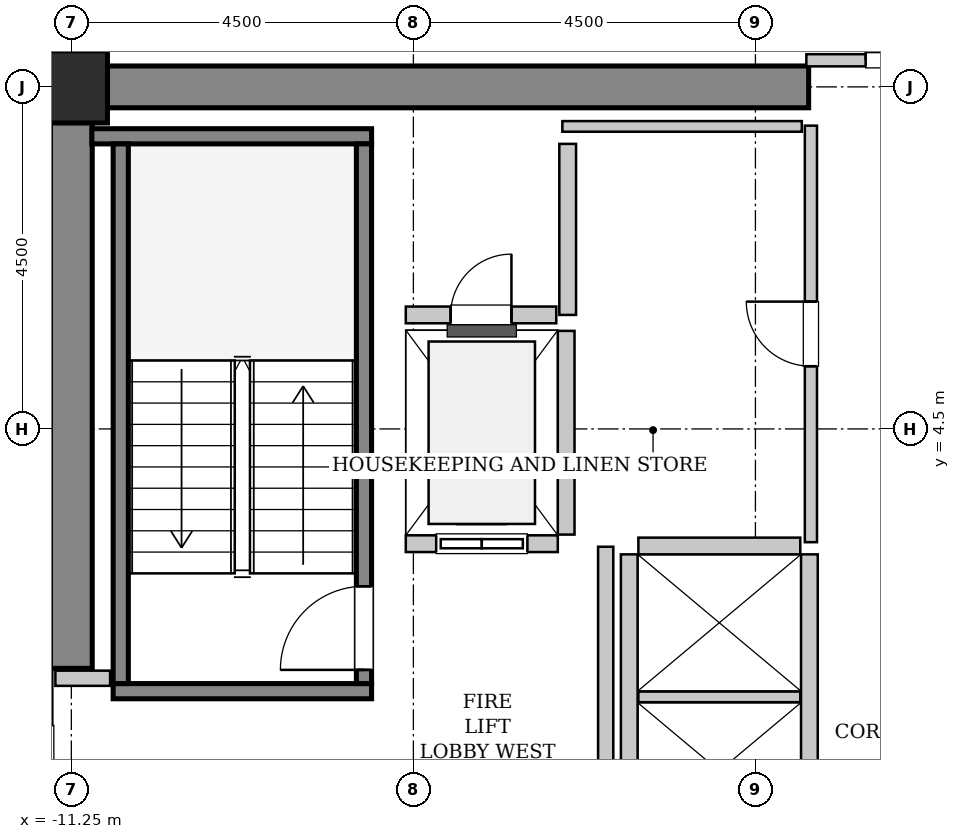
"""IFC4 building model, lengths in metres.
Left out: names, types, materials, properties, quantities, classifications, styles, units other than length and angle.
Written with IfcOpenShell. Run it as: python <this file> out.ifc"""

import sys

from ifc_helpers import new_model, si_unit, direction, frame, frame_2d, origin, origin_2d, place, context, subcontext, project, spatial, rectangle, hollow_rectangle, extrude, source, transform, mapped, element, fill, save


model = new_model("IFC4")
c1 = context("Model", 3, precision=1e-05, world=origin(), true_north=direction((0.0, 1.0)))
c2 = subcontext(c1, "Body", "Model", "MODEL_VIEW")
j1 = project(units=[si_unit("LENGTHUNIT", "METRE"), si_unit("PLANEANGLEUNIT", "RADIAN")], contexts=[c1])
p1 = place(None, origin())
s1 = spatial("IfcSite", under=j1, at=p1, CompositionType="ELEMENT")
p2 = place(p1, origin())
s2 = spatial("IfcBuilding", under=s1, at=p2, CompositionType="ELEMENT")
p3 = place(p2, frame((0.0, 0.0, 175.4)))
s3 = spatial("IfcBuildingStorey", under=s2, at=p3, CompositionType="ELEMENT", Elevation=175.4)
m1 = source(origin(), c2, "Body", "SweptSolid", [
    extrude(rectangle(XDim=9.975, YDim=0.55, at=frame_2d((4.987, 0.0))), origin(), (0.0, 0.0, 1.0), 3.8),
])
p4 = place(p3, frame((-11.525, 9.0, 0.0), z_axis=(0.0, 0.0, 1.0), x_axis=(1.0, 0.0, 0.0)))
e1 = element("IfcWall", 1, at=p4, inside=s3, PredefinedType="SHEAR", context=c2, shape_type="MappedRepresentation", body=[
    mapped(m1, transform((0.0, 0.0, 0.0), x_axis=(1.0, 0.0, 0.0), y_axis=(0.0, 1.0, 0.0), z_axis=(0.0, 0.0, 1.0), scale=1.0)),
])
m2 = source(origin(), c2, "Body", "SweptSolid", [
    extrude(rectangle(XDim=7.375, YDim=0.55, at=frame_2d((3.688, 0.0))), origin(), (0.0, 0.0, 1.0), 3.8),
])
p5 = place(p3, frame((-11.25, 1.35, 0.0), z_axis=(0.0, 0.0, 1.0), x_axis=(0.0, 1.0, 0.0)))
e2 = element("IfcWall", 2, at=p5, inside=s3, PredefinedType="SHEAR", context=c2, shape_type="MappedRepresentation", body=[
    mapped(m2, transform((0.0, 0.0, 0.0), x_axis=(1.0, 0.0, 0.0), y_axis=(0.0, 1.0, 0.0), z_axis=(0.0, 0.0, 1.0), scale=1.0)),
])
m3 = source(origin(), c2, "Body", "SweptSolid", [
    extrude(hollow_rectangle(XDim=0.95, YDim=0.95, WallThickness=0.045, InnerFilletRadius=0.045, OuterFilletRadius=0.09, at=origin_2d()), origin(), (0.0, 0.0, 1.0), 3.8),
])
p6 = place(p3, frame((-11.25, 9.0, 0.0), z_axis=(0.0, 0.0, 1.0), x_axis=(1.0, 0.0, 0.0)))
e3 = element("IfcColumn", 3, at=p6, inside=s3, PredefinedType="COLUMN", context=c2, shape_type="MappedRepresentation", body=[
    mapped(m3, transform((0.0, 0.0, 0.0), x_axis=(1.0, 0.0, 0.0), y_axis=(0.0, 1.0, 0.0), z_axis=(0.0, 0.0, 1.0), scale=1.0)),
])
m4 = source(origin(), c2, "Body", "SweptSolid", [
    extrude(rectangle(XDim=3.4, YDim=0.2, at=frame_2d((1.7, 0.0))), origin(), (0.0, 0.0, 1.0), 3.8),
])
p7 = place(p3, frame((-7.3, 1.05, 0.0), z_axis=(0.0, 0.0, 1.0), x_axis=(-1.0, 0.0, 0.0)))
e4 = element("IfcWall", 4, at=p7, inside=s3, PredefinedType="SOLIDWALL", context=c2, shape_type="MappedRepresentation", body=[
    mapped(m4, transform((0.0, 0.0, 0.0), x_axis=(1.0, 0.0, 0.0), y_axis=(0.0, 1.0, 0.0), z_axis=(0.0, 0.0, 1.0), scale=1.0)),
])
m5 = source(origin(), c2, "Body", "SweptSolid", [
    extrude(rectangle(XDim=3.68, YDim=0.2, at=frame_2d((1.84, 0.0))), origin(), (0.0, 0.0, 1.0), 3.8),
])
p8 = place(p3, frame((-7.3, 8.35, 0.0), z_axis=(0.0, 0.0, 1.0), x_axis=(-1.0, 0.0, 0.0)))
e5 = element("IfcWall", 5, at=p8, inside=s3, PredefinedType="SOLIDWALL", context=c2, shape_type="MappedRepresentation", body=[
    mapped(m5, transform((0.0, 0.0, 0.0), x_axis=(1.0, 0.0, 0.0), y_axis=(0.0, 1.0, 0.0), z_axis=(0.0, 0.0, 1.0), scale=1.0)),
])
m6 = source(origin(), c2, "Body", "SweptSolid", [
    extrude(rectangle(XDim=7.1, YDim=0.2, at=frame_2d((3.55, 0.0))), origin(), (0.0, 0.0, 1.0), 3.8),
])
p9 = place(p3, frame((-7.4, 1.15, 0.0), z_axis=(0.0, 0.0, 1.0), x_axis=(0.0, 1.0, 0.0)))
e6 = element("IfcWall", 6, at=p9, inside=s3, PredefinedType="SOLIDWALL", context=c2, shape_type="MappedRepresentation", body=[
    mapped(m6, transform((0.0, 0.0, 0.0), x_axis=(1.0, 0.0, 0.0), y_axis=(0.0, 1.0, 0.0), z_axis=(0.0, 0.0, 1.0), scale=1.0)),
])
p10 = place(p9, frame((0.18, 0.0, 0.0)))
e7 = element("IfcOpeningElement", 7, at=p10, cuts=e6, PredefinedType="OPENING", context=c2, shape_type="SweptSolid", body=[
    extrude(rectangle(XDim=1.1, YDim=2.15, at=frame_2d((0.55, 1.075))), frame((0.0, 0.11, 0.0), z_axis=(0.0, -1.0, 0.0), x_axis=(1.0, 0.0, 0.0)), (0.0, 0.0, 1.0), 0.22),
])
p11 = place(p3, frame((-10.6, 1.15, 0.0), z_axis=(0.0, 0.0, 1.0), x_axis=(0.0, 1.0, 0.0)))
e8 = element("IfcWall", 8, at=p11, inside=s3, PredefinedType="SOLIDWALL", context=c2, shape_type="MappedRepresentation", body=[
    mapped(m6, transform((0.0, 0.0, 0.0), x_axis=(1.0, 0.0, 0.0), y_axis=(0.0, 1.0, 0.0), z_axis=(0.0, 0.0, 1.0), scale=1.0)),
])
m7 = source(origin(), c2, "Body", "SweptSolid", [
    extrude(rectangle(XDim=2.0, YDim=0.22, at=frame_2d((1.0, 0.0))), origin(), (0.0, 0.0, 1.0), 3.535),
])
p12 = place(p3, frame((-6.85, 2.99, 0.0), z_axis=(0.0, 0.0, 1.0), x_axis=(1.0, 0.0, 0.0)))
e9 = element("IfcWall", 9, at=p12, inside=s3, PredefinedType="SOLIDWALL", context=c2, shape_type="MappedRepresentation", body=[
    mapped(m7, transform((0.0, 0.0, 0.0), x_axis=(1.0, 0.0, 0.0), y_axis=(0.0, 1.0, 0.0), z_axis=(0.0, 0.0, 1.0), scale=1.0)),
])
p13 = place(p12, frame((0.4, 0.0, 0.0)))
e10 = element("IfcOpeningElement", 10, at=p13, cuts=e9, PredefinedType="OPENING", context=c2, shape_type="SweptSolid", body=[
    extrude(rectangle(XDim=1.2, YDim=2.2, at=frame_2d((0.6, 1.1))), frame((0.0, 0.12, 0.0), z_axis=(0.0, -1.0, 0.0), x_axis=(1.0, 0.0, 0.0)), (0.0, 0.0, 1.0), 0.24),
])
m8 = source(origin(), c2, "Body", "SweptSolid", [
    extrude(rectangle(XDim=2.68, YDim=0.22, at=frame_2d((1.34, 0.0))), origin(), (0.0, 0.0, 1.0), 3.535),
])
p14 = place(p3, frame((-4.74, 3.11, 0.0), z_axis=(0.0, 0.0, 1.0), x_axis=(0.0, 1.0, 0.0)))
e11 = element("IfcWall", 11, at=p14, inside=s3, PredefinedType="SOLIDWALL", context=c2, shape_type="MappedRepresentation", body=[
    mapped(m8, transform((0.0, 0.0, 0.0), x_axis=(1.0, 0.0, 0.0), y_axis=(0.0, 1.0, 0.0), z_axis=(0.0, 0.0, 1.0), scale=1.0)),
])
m9 = source(origin(), c2, "Body", "SweptSolid", [
    extrude(rectangle(XDim=5.7, YDim=0.22, at=frame_2d((2.85, 0.0))), origin(), (0.0, 0.0, 1.0), 3.535),
])
for number, where, z_axis, x_axis in (
    (12, (-1.54, -2.85, 0.0), (0.0, 0.0, 1.0), (0.0, 1.0, 0.0)),
    (13, (-3.91, 2.85, 0.0), (0.0, 0.0, 1.0), (0.0, -1.0, 0.0)),
):
    element("IfcWall", number, at=place(p3, frame(where, z_axis=z_axis, x_axis=x_axis)), inside=s3, PredefinedType="SOLIDWALL", context=c2, shape_type="MappedRepresentation", body=[
        mapped(m9, transform((0.0, 0.0, 0.0), x_axis=(1.0, 0.0, 0.0), y_axis=(0.0, 1.0, 0.0), z_axis=(0.0, 0.0, 1.0), scale=1.0)),
    ])
m10 = source(origin(), c2, "Body", "SweptSolid", [
    extrude(rectangle(XDim=2.13, YDim=0.14, at=frame_2d((1.065, 0.0))), origin(), (0.0, 0.0, 1.0), 3.535),
])
p15 = place(p3, frame((-3.79, 0.975, 0.0), z_axis=(0.0, 0.0, 1.0), x_axis=(1.0, 0.0, 0.0)))
e14 = element("IfcWall", 14, at=p15, inside=s3, PredefinedType="PARTITIONING", context=c2, shape_type="MappedRepresentation", body=[
    mapped(m10, transform((0.0, 0.0, 0.0), x_axis=(1.0, 0.0, 0.0), y_axis=(0.0, 1.0, 0.0), z_axis=(0.0, 0.0, 1.0), scale=1.0)),
])
m11 = source(origin(), c2, "Body", "SweptSolid", [
    extrude(rectangle(XDim=2.13, YDim=0.22, at=frame_2d((1.065, 0.0))), origin(), (0.0, 0.0, 1.0), 3.535),
])
p16 = place(p3, frame((-1.66, 2.96, 0.0), z_axis=(0.0, 0.0, 1.0), x_axis=(-1.0, 0.0, 0.0)))
e15 = element("IfcWall", 15, at=p16, inside=s3, PredefinedType="SOLIDWALL", context=c2, shape_type="MappedRepresentation", body=[
    mapped(m11, transform((0.0, 0.0, 0.0), x_axis=(1.0, 0.0, 0.0), y_axis=(0.0, 1.0, 0.0), z_axis=(0.0, 0.0, 1.0), scale=1.0)),
])
m12 = source(origin(), c2, "Body", "SweptSolid", [
    extrude(rectangle(XDim=2.25, YDim=0.22, at=frame_2d((1.125, 0.0))), origin(), (0.0, 0.0, 1.0), 3.535),
])
p17 = place(p3, frame((-4.72, 6.0, 0.0), z_axis=(0.0, 0.0, 1.0), x_axis=(0.0, 1.0, 0.0)))
e16 = element("IfcWall", 16, at=p17, inside=s3, PredefinedType="SOLIDWALL", context=c2, shape_type="MappedRepresentation", body=[
    mapped(m12, transform((0.0, 0.0, 0.0), x_axis=(1.0, 0.0, 0.0), y_axis=(0.0, 1.0, 0.0), z_axis=(0.0, 0.0, 1.0), scale=1.0)),
])
m13 = source(origin(), c2, "Body", "SweptSolid", [
    extrude(rectangle(XDim=1.98, YDim=0.22, at=frame_2d((0.99, 0.0))), origin(), (0.0, 0.0, 1.0), 3.535),
])
p18 = place(p3, frame((-6.85, 6.0, 0.0), z_axis=(0.0, 0.0, 1.0), x_axis=(1.0, 0.0, 0.0)))
e17 = element("IfcWall", 17, at=p18, inside=s3, PredefinedType="SOLIDWALL", context=c2, shape_type="MappedRepresentation", body=[
    mapped(m13, transform((0.0, 0.0, 0.0), x_axis=(1.0, 0.0, 0.0), y_axis=(0.0, 1.0, 0.0), z_axis=(0.0, 0.0, 1.0), scale=1.0)),
])
p19 = place(p18, frame((0.59, 0.0, 0.0)))
e18 = element("IfcOpeningElement", 18, at=p19, cuts=e17, PredefinedType="OPENING", context=c2, shape_type="SweptSolid", body=[
    extrude(rectangle(XDim=0.8, YDim=2.0, at=frame_2d((0.4, 1.0))), frame((0.0, 0.12, 0.0), z_axis=(0.0, -1.0, 0.0), x_axis=(1.0, 0.0, 0.0)), (0.0, 0.0, 1.0), 0.24),
])
m14 = source(origin(), c2, "Body", "SweptSolid", [
    extrude(rectangle(XDim=5.9, YDim=0.2, at=frame_2d((2.95, 0.0))), origin(), (0.0, 0.0, 1.0), 3.535),
])
p20 = place(p3, frame((-4.22, -2.95, 0.0), z_axis=(0.0, 0.0, 1.0), x_axis=(0.0, 1.0, 0.0)))
e19 = element("IfcWall", 19, at=p20, inside=s3, PredefinedType="PARTITIONING", context=c2, shape_type="MappedRepresentation", body=[
    mapped(m14, transform((0.0, 0.0, 0.0), x_axis=(1.0, 0.0, 0.0), y_axis=(0.0, 1.0, 0.0), z_axis=(0.0, 0.0, 1.0), scale=1.0)),
])
m15 = source(origin(), c2, "Body", "SweptSolid", [
    extrude(rectangle(XDim=0.72, YDim=0.2, at=frame_2d((0.36, 0.0))), origin(), (0.0, 0.0, 1.0), 3.535),
])
p21 = place(p3, frame((-11.46, 1.22, 0.0), z_axis=(0.0, 0.0, 1.0), x_axis=(1.0, 0.0, 0.0)))
e20 = element("IfcWall", 20, at=p21, inside=s3, PredefinedType="PARTITIONING", context=c2, shape_type="MappedRepresentation", body=[
    mapped(m15, transform((0.0, 0.0, 0.0), x_axis=(1.0, 0.0, 0.0), y_axis=(0.0, 1.0, 0.0), z_axis=(0.0, 0.0, 1.0), scale=1.0)),
])
m16 = source(origin(), c2, "Body", "SweptSolid", [
    extrude(rectangle(XDim=3.16, YDim=0.16, at=frame_2d((1.58, 0.0))), origin(), (0.0, 0.0, 1.0), 2.425),
])
p22 = place(p3, frame((-1.58, 9.35, 0.0), z_axis=(0.0, 0.0, 1.0), x_axis=(1.0, 0.0, 0.0)))
e21 = element("IfcWall", 21, at=p22, inside=s3, PredefinedType="PARTITIONING", context=c2, shape_type="MappedRepresentation", body=[
    mapped(m16, transform((0.0, 0.0, 0.0), x_axis=(1.0, 0.0, 0.0), y_axis=(0.0, 1.0, 0.0), z_axis=(0.0, 0.0, 1.0), scale=1.0)),
])
p23 = place(p22, frame((0.78, 0.0, 0.0)))
e22 = element("IfcOpeningElement", 22, at=p23, cuts=e21, PredefinedType="OPENING", context=c2, shape_type="SweptSolid", body=[
    extrude(rectangle(XDim=1.6, YDim=2.3, at=frame_2d((0.8, 1.15))), frame((0.0, 0.09, 0.0), z_axis=(0.0, -1.0, 0.0), x_axis=(1.0, 0.0, 0.0)), (0.0, 0.0, 1.0), 0.18),
])
m17 = source(origin(), c2, "Body", "SweptSolid", [
    extrude(rectangle(XDim=5.48, YDim=0.16, at=frame_2d((2.74, 0.0))), origin(), (0.0, 0.0, 1.0), 3.535),
])
p24 = place(p3, frame((-1.52, 3.01, 0.0), z_axis=(0.0, 0.0, 1.0), x_axis=(0.0, 1.0, 0.0)))
e23 = element("IfcWall", 23, at=p24, inside=s3, PredefinedType="PARTITIONING", context=c2, shape_type="MappedRepresentation", body=[
    mapped(m17, transform((0.0, 0.0, 0.0), x_axis=(1.0, 0.0, 0.0), y_axis=(0.0, 1.0, 0.0), z_axis=(0.0, 0.0, 1.0), scale=1.0)),
])
p25 = place(p24, frame((2.315, 0.0, 0.0)))
e24 = element("IfcOpeningElement", 24, at=p25, cuts=e23, PredefinedType="OPENING", context=c2, shape_type="SweptSolid", body=[
    extrude(rectangle(XDim=0.85, YDim=2.1, at=frame_2d((0.425, 1.05))), frame((0.0, 0.09, 0.0), z_axis=(0.0, -1.0, 0.0), x_axis=(1.0, 0.0, 0.0)), (0.0, 0.0, 1.0), 0.18),
])
m18 = source(origin(), c2, "Body", "SweptSolid", [
    extrude(rectangle(XDim=3.15, YDim=0.14, at=frame_2d((1.575, 0.0))), origin(), (0.0, 0.0, 1.0), 3.535),
])
p26 = place(p3, frame((-4.79, 8.48, 0.0), z_axis=(0.0, 0.0, 1.0), x_axis=(1.0, 0.0, 0.0)))
e25 = element("IfcWall", 25, at=p26, inside=s3, PredefinedType="PARTITIONING", context=c2, shape_type="MappedRepresentation", body=[
    mapped(m18, transform((0.0, 0.0, 0.0), x_axis=(1.0, 0.0, 0.0), y_axis=(0.0, 1.0, 0.0), z_axis=(0.0, 0.0, 1.0), scale=1.0)),
])
m19 = source(origin(), c2, "Body", "SweptSolid", [
    extrude(rectangle(XDim=1.1, YDim=2.15, at=frame_2d((0.55, 1.075))), frame((0.0, 0.025, 0.0), z_axis=(0.0, -1.0, 0.0), x_axis=(1.0, 0.0, 0.0)), (0.0, 0.0, 1.0), 0.05),
])
p27 = place(p10, origin())
e26 = element("IfcDoor", 26, at=p27, inside=s3, OperationType="SINGLE_SWING_LEFT", PredefinedType="DOOR", context=c2, shape_type="MappedRepresentation", body=[
    mapped(m19, transform((0.0, 0.0, 0.0), x_axis=(1.0, 0.0, 0.0), y_axis=(0.0, 1.0, 0.0), z_axis=(0.0, 0.0, 1.0), scale=1.0)),
])
fill(e7, e26)
m20 = source(origin(), c2, "Body", "SweptSolid", [
    extrude(rectangle(XDim=1.2, YDim=2.2, at=frame_2d((0.6, 1.1))), frame((0.0, 0.025, 0.0), z_axis=(0.0, -1.0, 0.0), x_axis=(1.0, 0.0, 0.0)), (0.0, 0.0, 1.0), 0.05),
])
p28 = place(p13, origin())
e27 = element("IfcDoor", 27, at=p28, inside=s3, OperationType="SLIDING_TO_LEFT", PredefinedType="DOOR", context=c2, shape_type="MappedRepresentation", body=[
    mapped(m20, transform((0.0, 0.0, 0.0), x_axis=(1.0, 0.0, 0.0), y_axis=(0.0, 1.0, 0.0), z_axis=(0.0, 0.0, 1.0), scale=1.0)),
])
fill(e10, e27)
m21 = source(origin(), c2, "Body", "SweptSolid", [
    extrude(rectangle(XDim=0.8, YDim=2.0, at=frame_2d((0.4, 1.0))), frame((0.0, 0.025, 0.0), z_axis=(0.0, -1.0, 0.0), x_axis=(1.0, 0.0, 0.0)), (0.0, 0.0, 1.0), 0.05),
])
p29 = place(p19, origin())
e28 = element("IfcDoor", 28, at=p29, inside=s3, OperationType="SINGLE_SWING_RIGHT", PredefinedType="TRAPDOOR", context=c2, shape_type="MappedRepresentation", body=[
    mapped(m21, transform((0.0, 0.0, 0.0), x_axis=(1.0, 0.0, 0.0), y_axis=(0.0, 1.0, 0.0), z_axis=(0.0, 0.0, 1.0), scale=1.0)),
])
fill(e18, e28)
m22 = source(origin(), c2, "Body", "SweptSolid", [
    extrude(rectangle(XDim=1.6, YDim=2.3, at=frame_2d((0.8, 1.15))), frame((0.0, 0.025, 0.0), z_axis=(0.0, -1.0, 0.0), x_axis=(1.0, 0.0, 0.0)), (0.0, 0.0, 1.0), 0.05),
])
p30 = place(p23, origin())
e29 = element("IfcDoor", 29, at=p30, inside=s3, OperationType="DOUBLE_DOOR_SINGLE_SWING", PredefinedType="DOOR", context=c2, shape_type="MappedRepresentation", body=[
    mapped(m22, transform((0.0, 0.0, 0.0), x_axis=(1.0, 0.0, 0.0), y_axis=(0.0, 1.0, 0.0), z_axis=(0.0, 0.0, 1.0), scale=1.0)),
])
fill(e22, e29)
m23 = source(origin(), c2, "Body", "SweptSolid", [
    extrude(rectangle(XDim=0.85, YDim=2.1, at=frame_2d((0.425, 1.05))), frame((0.0, 0.025, 0.0), z_axis=(0.0, -1.0, 0.0), x_axis=(1.0, 0.0, 0.0)), (0.0, 0.0, 1.0), 0.05),
])
p31 = place(p25, origin())
e30 = element("IfcDoor", 30, at=p31, inside=s3, OperationType="SINGLE_SWING_RIGHT", PredefinedType="DOOR", context=c2, shape_type="MappedRepresentation", body=[
    mapped(m23, transform((0.0, 0.0, 0.0), x_axis=(1.0, 0.0, 0.0), y_axis=(0.0, 1.0, 0.0), z_axis=(0.0, 0.0, 1.0), scale=1.0)),
])
fill(e24, e30)
save(model, sys.argv[1])
